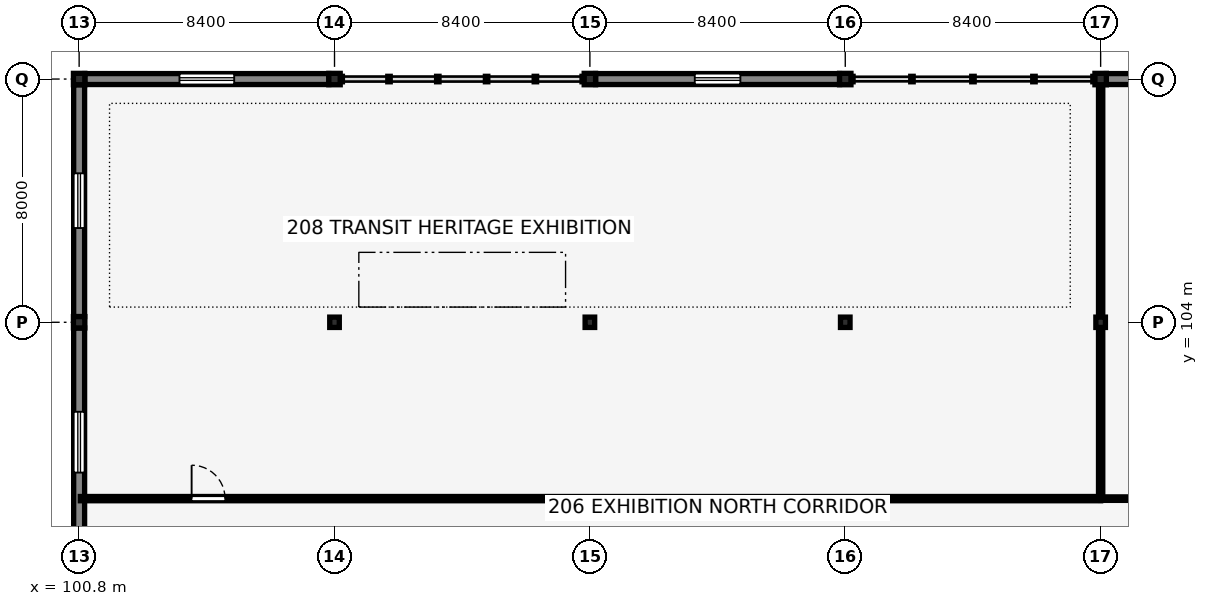
"""IFC4 building model, lengths in metres.
Left out: names, types, materials, properties, quantities, classifications, styles, units other than length and angle.
Written with IfcOpenShell. Run it as: python <this file> out.ifc"""

import sys

from ifc_helpers import new_model, si_unit, direction, frame, frame_2d, origin, origin_2d, place, context, subcontext, project, spatial, rectangle, i_section, extrude, element, fill, save


model = new_model("IFC4")
c1 = context("Model", 3, precision=1e-05, world=origin(), true_north=direction((0.0, 1.0)))
c2 = subcontext(c1, "Body", "Model", "MODEL_VIEW")
j1 = project(units=[si_unit("LENGTHUNIT", "METRE"), si_unit("PLANEANGLEUNIT", "RADIAN")], contexts=[c1])
p1 = place(None, origin())
s1 = spatial("IfcSite", under=j1, at=p1, CompositionType="ELEMENT")
p2 = place(p1, origin())
s2 = spatial("IfcBuilding", under=s1, at=p2, CompositionType="ELEMENT")
p3 = place(p2, frame((0.0, 0.0, 9.52)))
s3 = spatial("IfcBuildingStorey", under=s2, at=p3, CompositionType="ELEMENT", Elevation=9.52)
for number, where, z_axis, x_axis in (
    (1, (100.8, 104.0, 0.0), (0.0, 0.0, 1.0), (1.0, 0.0, 0.0)),
    (2, (100.8, 112.0, 0.0), (0.0, 0.0, 1.0), (1.0, 0.0, 0.0)),
):
    element("IfcColumn", number, at=place(p3, frame(where, z_axis=z_axis, x_axis=x_axis)), inside=s3, PredefinedType="COLUMN", context=c2, shape_type="SweptSolid", body=[
        extrude(i_section(OverallWidth=0.375, OverallDepth=0.375, WebThickness=0.017, FlangeThickness=0.027, FilletRadius=0.015, at=origin_2d()), origin(), (0.0, 0.0, 1.0), 3.57),
    ])
p4 = place(p3, frame((109.2, 104.0, 0.0), z_axis=(0.0, 0.0, 1.0), x_axis=(1.0, 0.0, 0.0)))
e3 = element("IfcColumn", 3, at=p4, inside=s3, PredefinedType="COLUMN", context=c2, shape_type="SweptSolid", body=[
    extrude(i_section(OverallWidth=0.314, OverallDepth=0.34, WebThickness=0.019, FlangeThickness=0.031, FilletRadius=0.015, at=origin_2d()), origin(), (0.0, 0.0, 1.0), 3.57),
])
p5 = place(p3, frame((109.2, 112.0, 0.0), z_axis=(0.0, 0.0, 1.0), x_axis=(1.0, 0.0, 0.0)))
e4 = element("IfcColumn", 4, at=p5, inside=s3, PredefinedType="COLUMN", context=c2, shape_type="SweptSolid", body=[
    extrude(i_section(OverallWidth=0.375, OverallDepth=0.375, WebThickness=0.017, FlangeThickness=0.027, FilletRadius=0.015, at=origin_2d()), origin(), (0.0, 0.0, 1.0), 3.57),
])
p6 = place(p3, frame((117.6, 104.0, 0.0), z_axis=(0.0, 0.0, 1.0), x_axis=(1.0, 0.0, 0.0)))
e5 = element("IfcColumn", 5, at=p6, inside=s3, PredefinedType="COLUMN", context=c2, shape_type="SweptSolid", body=[
    extrude(i_section(OverallWidth=0.314, OverallDepth=0.34, WebThickness=0.019, FlangeThickness=0.031, FilletRadius=0.015, at=origin_2d()), origin(), (0.0, 0.0, 1.0), 3.57),
])
p7 = place(p3, frame((117.6, 112.0, 0.0), z_axis=(0.0, 0.0, 1.0), x_axis=(1.0, 0.0, 0.0)))
e6 = element("IfcColumn", 6, at=p7, inside=s3, PredefinedType="COLUMN", context=c2, shape_type="SweptSolid", body=[
    extrude(i_section(OverallWidth=0.375, OverallDepth=0.375, WebThickness=0.017, FlangeThickness=0.027, FilletRadius=0.015, at=origin_2d()), origin(), (0.0, 0.0, 1.0), 3.57),
])
p8 = place(p3, frame((126.0, 104.0, 0.0), z_axis=(0.0, 0.0, 1.0), x_axis=(1.0, 0.0, 0.0)))
e7 = element("IfcColumn", 7, at=p8, inside=s3, PredefinedType="COLUMN", context=c2, shape_type="SweptSolid", body=[
    extrude(i_section(OverallWidth=0.314, OverallDepth=0.34, WebThickness=0.019, FlangeThickness=0.031, FilletRadius=0.015, at=origin_2d()), origin(), (0.0, 0.0, 1.0), 3.57),
])
p9 = place(p3, frame((126.0, 112.0, 0.0), z_axis=(0.0, 0.0, 1.0), x_axis=(1.0, 0.0, 0.0)))
e8 = element("IfcColumn", 8, at=p9, inside=s3, PredefinedType="COLUMN", context=c2, shape_type="SweptSolid", body=[
    extrude(i_section(OverallWidth=0.375, OverallDepth=0.375, WebThickness=0.017, FlangeThickness=0.027, FilletRadius=0.015, at=origin_2d()), origin(), (0.0, 0.0, 1.0), 3.57),
])
p10 = place(p3, frame((134.4, 104.0, 0.0), z_axis=(0.0, 0.0, 1.0), x_axis=(1.0, 0.0, 0.0)))
e9 = element("IfcColumn", 9, at=p10, inside=s3, PredefinedType="COLUMN", context=c2, shape_type="SweptSolid", body=[
    extrude(i_section(OverallWidth=0.314, OverallDepth=0.34, WebThickness=0.019, FlangeThickness=0.031, FilletRadius=0.015, at=origin_2d()), origin(), (0.0, 0.0, 1.0), 3.57),
])
p11 = place(p3, frame((134.4, 112.0, 0.0), z_axis=(0.0, 0.0, 1.0), x_axis=(1.0, 0.0, 0.0)))
e10 = element("IfcColumn", 10, at=p11, inside=s3, PredefinedType="COLUMN", context=c2, shape_type="SweptSolid", body=[
    extrude(i_section(OverallWidth=0.375, OverallDepth=0.375, WebThickness=0.017, FlangeThickness=0.027, FilletRadius=0.015, at=origin_2d()), origin(), (0.0, 0.0, 1.0), 3.57),
])
p12 = place(p3, frame((100.8, 96.3, 0.0), z_axis=(0.0, 0.0, 1.0), x_axis=(0.0, 1.0, 0.0)))
e11 = element("IfcWall", 11, at=p12, inside=s3, PredefinedType="SOLIDWALL", context=c2, shape_type="SweptSolid", body=[
    extrude(rectangle(XDim=7.513, YDim=0.36, at=frame_2d((3.756, 0.0))), origin(), (0.0, 0.0, 1.0), 3.219),
])
p13 = place(p12, frame((2.756, 0.0, 0.9), z_axis=(0.0, 0.0, 1.0), x_axis=(1.0, 0.0, 0.0)))
e12 = element("IfcOpeningElement", 12, at=p13, cuts=e11, PredefinedType="OPENING", context=c2, shape_type="SweptSolid", body=[
    extrude(rectangle(XDim=2.0, YDim=1.5, at=frame_2d((1.0, 0.75))), frame((0.0, 0.19, 0.0), z_axis=(0.0, -1.0, 0.0), x_axis=(1.0, 0.0, 0.0)), (0.0, 0.0, 1.0), 0.38),
])
p14 = place(p3, frame((100.8, 104.187, 0.0), z_axis=(0.0, 0.0, 1.0), x_axis=(0.0, 1.0, 0.0)))
e13 = element("IfcWall", 13, at=p14, inside=s3, PredefinedType="SOLIDWALL", context=c2, shape_type="SweptSolid", body=[
    extrude(rectangle(XDim=7.625, YDim=0.36, at=frame_2d((3.813, 0.0))), origin(), (0.0, 0.0, 1.0), 3.219),
])
p15 = place(p14, frame((2.913, 0.0, 0.9), z_axis=(0.0, 0.0, 1.0), x_axis=(1.0, 0.0, 0.0)))
e14 = element("IfcOpeningElement", 14, at=p15, cuts=e13, PredefinedType="OPENING", context=c2, shape_type="SweptSolid", body=[
    extrude(rectangle(XDim=1.8, YDim=1.45, at=frame_2d((0.9, 0.725))), frame((0.0, 0.19, 0.0), z_axis=(0.0, -1.0, 0.0), x_axis=(1.0, 0.0, 0.0)), (0.0, 0.0, 1.0), 0.38),
])
p16 = place(p3, frame((100.987, 112.0, 0.0), z_axis=(0.0, 0.0, 1.0), x_axis=(1.0, 0.0, 0.0)))
e15 = element("IfcWall", 15, at=p16, inside=s3, PredefinedType="SOLIDWALL", context=c2, shape_type="SweptSolid", body=[
    extrude(rectangle(XDim=8.025, YDim=0.36, at=frame_2d((4.013, 0.0))), origin(), (0.0, 0.0, 1.0), 3.27),
])
p17 = place(p16, frame((3.113, 0.0, 0.9), z_axis=(0.0, 0.0, 1.0), x_axis=(1.0, 0.0, 0.0)))
e16 = element("IfcOpeningElement", 16, at=p17, cuts=e15, PredefinedType="OPENING", context=c2, shape_type="SweptSolid", body=[
    extrude(rectangle(XDim=1.8, YDim=1.3, at=frame_2d((0.9, 0.65))), frame((0.0, 0.19, 0.0), z_axis=(0.0, -1.0, 0.0), x_axis=(1.0, 0.0, 0.0)), (0.0, 0.0, 1.0), 0.38),
])
p18 = place(p3, frame((117.787, 112.0, 0.0), z_axis=(0.0, 0.0, 1.0), x_axis=(1.0, 0.0, 0.0)))
e17 = element("IfcWall", 17, at=p18, inside=s3, PredefinedType="SOLIDWALL", context=c2, shape_type="SweptSolid", body=[
    extrude(rectangle(XDim=8.025, YDim=0.36, at=frame_2d((4.013, 0.0))), origin(), (0.0, 0.0, 1.0), 3.27),
])
p19 = place(p18, frame((3.263, 0.0, 0.9), z_axis=(0.0, 0.0, 1.0), x_axis=(1.0, 0.0, 0.0)))
e18 = element("IfcOpeningElement", 18, at=p19, cuts=e17, PredefinedType="OPENING", context=c2, shape_type="SweptSolid", body=[
    extrude(rectangle(XDim=1.5, YDim=1.4, at=frame_2d((0.75, 0.7))), frame((0.0, 0.19, 0.0), z_axis=(0.0, -1.0, 0.0), x_axis=(1.0, 0.0, 0.0)), (0.0, 0.0, 1.0), 0.38),
])
p20 = place(p3, frame((134.587, 112.0, 0.0), z_axis=(0.0, 0.0, 1.0), x_axis=(1.0, 0.0, 0.0)))
e19 = element("IfcWall", 19, at=p20, inside=s3, PredefinedType="SOLIDWALL", context=c2, shape_type="SweptSolid", body=[
    extrude(rectangle(XDim=8.025, YDim=0.36, at=frame_2d((4.013, 0.0))), origin(), (0.0, 0.0, 1.0), 3.27),
])
p21 = place(p20, frame((2.413, 0.0, 1.55), z_axis=(0.0, 0.0, 1.0), x_axis=(1.0, 0.0, 0.0)))
e20 = element("IfcOpeningElement", 20, at=p21, cuts=e19, PredefinedType="OPENING", context=c2, shape_type="SweptSolid", body=[
    extrude(rectangle(XDim=3.2, YDim=0.9, at=frame_2d((1.6, 0.45))), frame((0.0, 0.19, 0.0), z_axis=(0.0, -1.0, 0.0), x_axis=(1.0, 0.0, 0.0)), (0.0, 0.0, 1.0), 0.38),
])
p22 = place(p3, frame((100.84, 98.2, 0.0), z_axis=(0.0, 0.0, 1.0), x_axis=(1.0, 0.0, 0.0)))
e21 = element("IfcWall", 21, at=p22, inside=s3, PredefinedType="PARTITIONING", context=c2, shape_type="SweptSolid", body=[
    extrude(rectangle(XDim=33.56, YDim=0.14, at=frame_2d((16.78, 0.0))), origin(), (0.0, 0.0, 1.0), 3.57),
])
p23 = place(p22, frame((3.66, 0.0, 0.0), z_axis=(0.0, 0.0, 1.0), x_axis=(1.0, 0.0, 0.0)))
e22 = element("IfcOpeningElement", 22, at=p23, cuts=e21, PredefinedType="OPENING", context=c2, shape_type="SweptSolid", body=[
    extrude(rectangle(XDim=1.1, YDim=2.2, at=frame_2d((0.55, 1.1))), frame((0.0, 0.08, 0.0), z_axis=(0.0, -1.0, 0.0), x_axis=(1.0, 0.0, 0.0)), (0.0, 0.0, 1.0), 0.16),
])
p24 = place(p3, frame((134.4, 98.2, 0.0), z_axis=(0.0, 0.0, 1.0), x_axis=(1.0, 0.0, 0.0)))
e23 = element("IfcWall", 23, at=p24, inside=s3, PredefinedType="PARTITIONING", context=c2, shape_type="SweptSolid", body=[
    extrude(rectangle(XDim=16.8, YDim=0.115, at=frame_2d((8.4, 0.0))), origin(), (0.0, 0.0, 1.0), 3.107),
])
p25 = place(p24, frame((3.7, 0.0, 0.0), z_axis=(0.0, 0.0, 1.0), x_axis=(1.0, 0.0, 0.0)))
e24 = element("IfcOpeningElement", 24, at=p25, cuts=e23, PredefinedType="OPENING", context=c2, shape_type="SweptSolid", body=[
    extrude(rectangle(XDim=0.9, YDim=2.1, at=frame_2d((0.45, 1.05))), frame((0.0, 0.067, 0.0), z_axis=(0.0, -1.0, 0.0), x_axis=(1.0, 0.0, 0.0)), (0.0, 0.0, 1.0), 0.135),
])
p26 = place(p3, frame((134.4, 98.2, 0.0), z_axis=(0.0, 0.0, 1.0), x_axis=(0.0, 1.0, 0.0)))
e25 = element("IfcWall", 25, at=p26, inside=s3, PredefinedType="PARTITIONING", context=c2, shape_type="SweptSolid", body=[
    extrude(rectangle(XDim=5.64, YDim=0.14, at=frame_2d((2.82, 0.0))), origin(), (0.0, 0.0, 1.0), 3.107),
])
p27 = place(p3, frame((134.4, 104.16, 0.0), z_axis=(0.0, 0.0, 1.0), x_axis=(0.0, 1.0, 0.0)))
e26 = element("IfcWall", 26, at=p27, inside=s3, PredefinedType="PARTITIONING", context=c2, shape_type="SweptSolid", body=[
    extrude(rectangle(XDim=7.663, YDim=0.14, at=frame_2d((3.832, 0.0))), origin(), (0.0, 0.0, 1.0), 3.107),
])
p28 = place(p13, origin())
e27 = element("IfcWindow", 27, at=p28, inside=s3, PartitioningType="DOUBLE_PANEL_VERTICAL", PredefinedType="WINDOW", context=c2, shape_type="SweptSolid", body=[
    extrude(rectangle(XDim=2.0, YDim=1.5, at=frame_2d((1.0, 0.75))), frame((0.0, 0.03, 0.0), z_axis=(0.0, -1.0, 0.0), x_axis=(1.0, 0.0, 0.0)), (0.0, 0.0, 1.0), 0.06),
])
fill(e12, e27)
p29 = place(p15, origin())
e28 = element("IfcWindow", 28, at=p29, inside=s3, PartitioningType="DOUBLE_PANEL_VERTICAL", PredefinedType="WINDOW", context=c2, shape_type="SweptSolid", body=[
    extrude(rectangle(XDim=1.8, YDim=1.45, at=frame_2d((0.9, 0.725))), frame((0.0, 0.03, 0.0), z_axis=(0.0, -1.0, 0.0), x_axis=(1.0, 0.0, 0.0)), (0.0, 0.0, 1.0), 0.06),
])
fill(e14, e28)
p30 = place(p17, origin())
e29 = element("IfcWindow", 29, at=p30, inside=s3, PartitioningType="DOUBLE_PANEL_VERTICAL", PredefinedType="WINDOW", context=c2, shape_type="SweptSolid", body=[
    extrude(rectangle(XDim=1.8, YDim=1.3, at=frame_2d((0.9, 0.65))), frame((0.0, 0.03, 0.0), z_axis=(0.0, -1.0, 0.0), x_axis=(1.0, 0.0, 0.0)), (0.0, 0.0, 1.0), 0.06),
])
fill(e16, e29)
p31 = place(p19, origin())
e30 = element("IfcWindow", 30, at=p31, inside=s3, PartitioningType="SINGLE_PANEL", PredefinedType="WINDOW", context=c2, shape_type="SweptSolid", body=[
    extrude(rectangle(XDim=1.5, YDim=1.4, at=frame_2d((0.75, 0.7))), frame((0.0, 0.03, 0.0), z_axis=(0.0, -1.0, 0.0), x_axis=(1.0, 0.0, 0.0)), (0.0, 0.0, 1.0), 0.06),
])
fill(e18, e30)
p32 = place(p23, origin())
e31 = element("IfcDoor", 31, at=p32, inside=s3, OperationType="SINGLE_SWING_LEFT", PredefinedType="DOOR", context=c2, shape_type="SweptSolid", body=[
    extrude(rectangle(XDim=1.1, YDim=2.2, at=frame_2d((0.55, 1.1))), frame((0.0, 0.025, 0.0), z_axis=(0.0, -1.0, 0.0), x_axis=(1.0, 0.0, 0.0)), (0.0, 0.0, 1.0), 0.05),
])
fill(e22, e31)
save(model, sys.argv[1])
